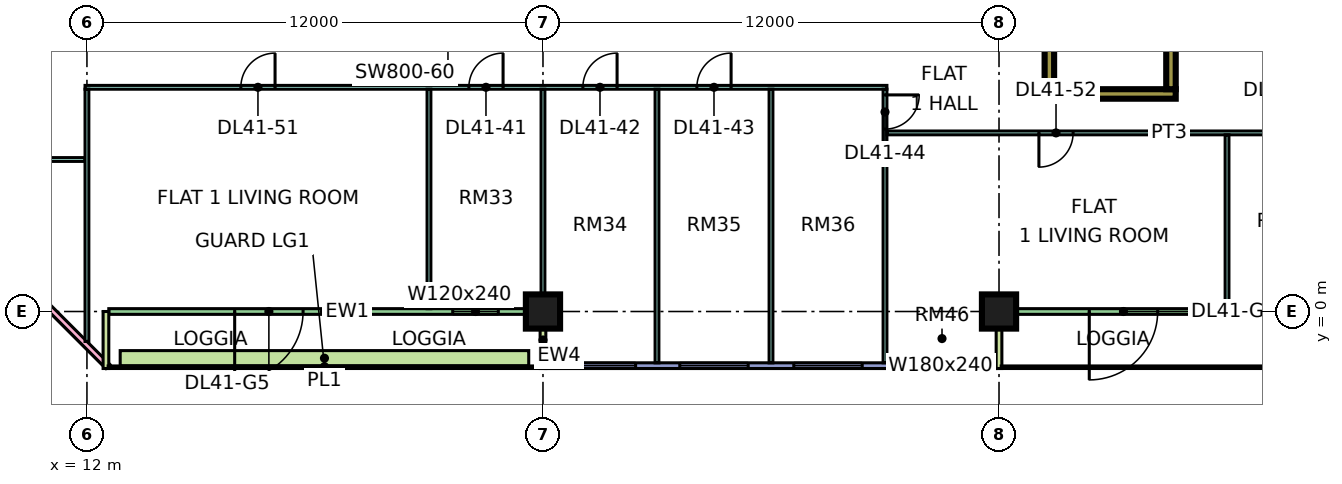
"""IFC4 building model, lengths in metres.
Left out: names, types, materials, properties, quantities, classifications, styles, units other than length and angle.
Written with IfcOpenShell. Run it as: python <this file> out.ifc"""

import sys

from ifc_helpers import new_model, si_unit, direction, frame, frame_2d, origin, origin_2d, place, context, subcontext, project, spatial, rectangle, extrude, element, fill, save


model = new_model("IFC4")
c1 = context("Model", 3, precision=1e-05, world=origin(), true_north=direction((0.0, 1.0)))
c2 = subcontext(c1, "Body", "Model", "MODEL_VIEW")
j1 = project(units=[si_unit("LENGTHUNIT", "METRE"), si_unit("PLANEANGLEUNIT", "RADIAN")], contexts=[c1])
p1 = place(None, origin())
s1 = spatial("IfcSite", under=j1, at=p1, CompositionType="ELEMENT")
p2 = place(p1, origin())
s2 = spatial("IfcBuilding", under=s1, at=p2, CompositionType="ELEMENT")
p3 = place(p2, frame((0.0, 0.0, 179.9)))
s3 = spatial("IfcBuildingStorey", under=s2, at=p3, CompositionType="ELEMENT", Elevation=179.9)
for number, where, z_axis, x_axis in (
    (1, (24.0, 0.0, 0.0), (0.0, 0.0, 1.0), (1.0, 0.0, 0.0)),
    (2, (36.0, 0.0, 0.0), (0.0, 0.0, 1.0), (1.0, 0.0, 0.0)),
):
    element("IfcColumn", number, at=place(p3, frame(where, z_axis=z_axis, x_axis=x_axis)), inside=s3, PredefinedType="COLUMN", context=c2, shape_type="SweptSolid", body=[
        extrude(rectangle(XDim=0.9, YDim=0.9, at=origin_2d()), origin(), (0.0, 0.0, 1.0), 3.75),
    ])
p4 = place(p3, frame((37.2, 5.725, 0.0), z_axis=(0.0, 0.0, 1.0), x_axis=(1.0, 0.0, 0.0)))
e3 = element("IfcWall", 3, at=p4, inside=s3, PredefinedType="SHEAR", context=c2, shape_type="SweptSolid", body=[
    extrude(rectangle(XDim=3.45, YDim=0.25, at=frame_2d((1.725, 0.0))), origin(), (0.0, 0.0, 1.0), 3.75),
])
for number, where, z_axis, x_axis in (
    (4, (37.325, 5.85, 0.0), (0.0, 0.0, 1.0), (0.0, 1.0, 0.0)),
    (5, (40.525, 5.85, 0.0), (0.0, 0.0, 1.0), (0.0, 1.0, 0.0)),
):
    element("IfcWall", number, at=place(p3, frame(where, z_axis=z_axis, x_axis=x_axis)), inside=s3, PredefinedType="SHEAR", context=c2, shape_type="SweptSolid", body=[
        extrude(rectangle(XDim=6.5, YDim=0.25, at=frame_2d((3.25, 0.0))), origin(), (0.0, 0.0, 1.0), 3.75),
    ])
p5 = place(p3, frame((-1.447, 12.553, 0.0), z_axis=(0.0, 0.0, 1.0), x_axis=(0.707106781187, -0.707106781187, 0.0)))
e6 = element("IfcWall", 6, at=p5, inside=s3, PredefinedType="SOLIDWALL", context=c2, shape_type="SweptSolid", body=[
    extrude(rectangle(XDim=19.799, YDim=0.15, at=frame_2d((9.899, 0.0))), origin(), (0.0, 0.0, 1.0), 3.35),
])
p6 = place(p5, frame((2.212, 0.0, 0.45)))
e7 = element("IfcOpeningElement", 7, at=p6, cuts=e6, PredefinedType="OPENING", context=c2, shape_type="SweptSolid", body=[
    extrude(rectangle(XDim=3.0, YDim=2.4, at=frame_2d((1.5, 1.2))), frame((0.0, 0.085, 0.0), z_axis=(0.0, -1.0, 0.0), x_axis=(1.0, 0.0, 0.0)), (0.0, 0.0, 1.0), 0.17),
])
p7 = place(p5, frame((10.216, 0.0, 0.45)))
e8 = element("IfcOpeningElement", 8, at=p7, cuts=e6, PredefinedType="OPENING", context=c2, shape_type="SweptSolid", body=[
    extrude(rectangle(XDim=3.0, YDim=2.4, at=frame_2d((1.5, 1.2))), frame((0.0, 0.085, 0.0), z_axis=(0.0, -1.0, 0.0), x_axis=(1.0, 0.0, 0.0)), (0.0, 0.0, 1.0), 0.17),
])
p8 = place(p3, frame((12.575, 0.0, 0.0), z_axis=(0.0, 0.0, 1.0), x_axis=(1.0, 0.0, 0.0)))
e9 = element("IfcWall", 9, at=p8, inside=s3, PredefinedType="SOLIDWALL", context=c2, shape_type="SweptSolid", body=[
    extrude(rectangle(XDim=11.35, YDim=0.15, at=frame_2d((5.675, 0.0))), origin(), (0.0, 0.0, 1.0), 3.35),
])
p9 = place(p8, frame((3.312, 0.0, 0.0)))
e10 = element("IfcOpeningElement", 10, at=p9, cuts=e9, PredefinedType="OPENING", context=c2, shape_type="SweptSolid", body=[
    extrude(rectangle(XDim=1.8, YDim=2.4, at=frame_2d((0.9, 1.2))), frame((0.0, 0.085, 0.0), z_axis=(0.0, -1.0, 0.0), x_axis=(1.0, 0.0, 0.0)), (0.0, 0.0, 1.0), 0.17),
])
p10 = place(p8, frame((9.05, 0.0, 0.45)))
e11 = element("IfcOpeningElement", 11, at=p10, cuts=e9, PredefinedType="OPENING", context=c2, shape_type="SweptSolid", body=[
    extrude(rectangle(XDim=1.2, YDim=2.4, at=frame_2d((0.6, 1.2))), frame((0.0, 0.085, 0.0), z_axis=(0.0, -1.0, 0.0), x_axis=(1.0, 0.0, 0.0)), (0.0, 0.0, 1.0), 0.17),
])
for number, where, z_axis, x_axis in (
    (12, (12.5, -1.5, 0.0), (0.0, 0.0, 1.0), (0.0, 1.0, 0.0)),
    (13, (24.0, -1.5, 0.0), (0.0, 0.0, 1.0), (0.0, 1.0, 0.0)),
):
    element("IfcWall", number, at=place(p3, frame(where, z_axis=z_axis, x_axis=x_axis)), inside=s3, PredefinedType="SOLIDWALL", context=c2, shape_type="SweptSolid", body=[
        extrude(rectangle(XDim=1.5, YDim=0.15, at=frame_2d((0.75, 0.0))), origin(), (0.0, 0.0, 1.0), 3.35),
    ])
p11 = place(p3, frame((24.075, -1.425, 0.0), z_axis=(0.0, 0.0, 1.0), x_axis=(1.0, 0.0, 0.0)))
e14 = element("IfcWall", 14, at=p11, inside=s3, PredefinedType="SOLIDWALL", context=c2, shape_type="SweptSolid", body=[
    extrude(rectangle(XDim=11.85, YDim=0.15, at=frame_2d((5.925, 0.0))), origin(), (0.0, 0.0, 1.0), 3.35),
])
p12 = place(p11, frame((0.562, 0.0, 0.45)))
e15 = element("IfcOpeningElement", 15, at=p12, cuts=e14, PredefinedType="OPENING", context=c2, shape_type="SweptSolid", body=[
    extrude(rectangle(XDim=1.8, YDim=2.4, at=frame_2d((0.9, 1.2))), frame((0.0, 0.085, 0.0), z_axis=(0.0, -1.0, 0.0), x_axis=(1.0, 0.0, 0.0)), (0.0, 0.0, 1.0), 0.17),
])
p13 = place(p11, frame((3.525, 0.0, 0.45)))
e16 = element("IfcOpeningElement", 16, at=p13, cuts=e14, PredefinedType="OPENING", context=c2, shape_type="SweptSolid", body=[
    extrude(rectangle(XDim=1.8, YDim=2.4, at=frame_2d((0.9, 1.2))), frame((0.0, 0.085, 0.0), z_axis=(0.0, -1.0, 0.0), x_axis=(1.0, 0.0, 0.0)), (0.0, 0.0, 1.0), 0.17),
])
p14 = place(p11, frame((6.525, 0.0, 0.45)))
e17 = element("IfcOpeningElement", 17, at=p14, cuts=e14, PredefinedType="OPENING", context=c2, shape_type="SweptSolid", body=[
    extrude(rectangle(XDim=1.8, YDim=2.4, at=frame_2d((0.9, 1.2))), frame((0.0, 0.085, 0.0), z_axis=(0.0, -1.0, 0.0), x_axis=(1.0, 0.0, 0.0)), (0.0, 0.0, 1.0), 0.17),
])
p15 = place(p11, frame((9.488, 0.0, 0.45)))
e18 = element("IfcOpeningElement", 18, at=p15, cuts=e14, PredefinedType="OPENING", context=c2, shape_type="SweptSolid", body=[
    extrude(rectangle(XDim=1.8, YDim=2.4, at=frame_2d((0.9, 1.2))), frame((0.0, 0.085, 0.0), z_axis=(0.0, -1.0, 0.0), x_axis=(1.0, 0.0, 0.0)), (0.0, 0.0, 1.0), 0.17),
])
p16 = place(p3, frame((36.075, 0.0, 0.0), z_axis=(0.0, 0.0, 1.0), x_axis=(1.0, 0.0, 0.0)))
e19 = element("IfcWall", 19, at=p16, inside=s3, PredefinedType="SOLIDWALL", context=c2, shape_type="SweptSolid", body=[
    extrude(rectangle(XDim=11.85, YDim=0.15, at=frame_2d((5.925, 0.0))), origin(), (0.0, 0.0, 1.0), 3.35),
])
p17 = place(p16, frame((2.3, 0.0, 0.0)))
e20 = element("IfcOpeningElement", 20, at=p17, cuts=e19, PredefinedType="OPENING", context=c2, shape_type="SweptSolid", body=[
    extrude(rectangle(XDim=1.8, YDim=2.4, at=frame_2d((0.9, 1.2))), frame((0.0, 0.085, 0.0), z_axis=(0.0, -1.0, 0.0), x_axis=(1.0, 0.0, 0.0)), (0.0, 0.0, 1.0), 0.17),
])
p18 = place(p16, frame((6.55, 0.0, 0.45)))
e21 = element("IfcOpeningElement", 21, at=p18, cuts=e19, PredefinedType="OPENING", context=c2, shape_type="SweptSolid", body=[
    extrude(rectangle(XDim=1.2, YDim=2.4, at=frame_2d((0.6, 1.2))), frame((0.0, 0.085, 0.0), z_axis=(0.0, -1.0, 0.0), x_axis=(1.0, 0.0, 0.0)), (0.0, 0.0, 1.0), 0.17),
])
p19 = place(p16, frame((10.062, 0.0, 0.45)))
e22 = element("IfcOpeningElement", 22, at=p19, cuts=e19, PredefinedType="OPENING", context=c2, shape_type="SweptSolid", body=[
    extrude(rectangle(XDim=1.2, YDim=2.4, at=frame_2d((0.6, 1.2))), frame((0.0, 0.085, 0.0), z_axis=(0.0, -1.0, 0.0), x_axis=(1.0, 0.0, 0.0)), (0.0, 0.0, 1.0), 0.17),
])
p20 = place(p3, frame((36.0, -1.5, 0.0), z_axis=(0.0, 0.0, 1.0), x_axis=(0.0, 1.0, 0.0)))
e23 = element("IfcWall", 23, at=p20, inside=s3, PredefinedType="SOLIDWALL", context=c2, shape_type="SweptSolid", body=[
    extrude(rectangle(XDim=1.5, YDim=0.15, at=frame_2d((0.75, 0.0))), origin(), (0.0, 0.0, 1.0), 3.35),
])
p21 = place(p3, frame((12.875, -1.229, 0.0), z_axis=(0.0, 0.0, 1.0), x_axis=(1.0, 0.0, 0.0)))
e24 = element("IfcWall", 24, at=p21, inside=s3, PredefinedType="SOLIDWALL", context=c2, shape_type="SweptSolid", body=[
    extrude(rectangle(XDim=10.75, YDim=0.4, at=frame_2d((5.375, 0.0))), origin(), (0.0, 0.0, 1.0), 0.7),
])
p22 = place(p3, frame((9.05, 4.0, 0.0), z_axis=(0.0, 0.0, 1.0), x_axis=(1.0, 0.0, 0.0)))
e25 = element("IfcWall", 25, at=p22, inside=s3, PredefinedType="PARTITIONING", context=c2, shape_type="SweptSolid", body=[
    extrude(rectangle(XDim=2.9, YDim=0.1, at=frame_2d((1.45, 0.0))), origin(), (0.0, 0.0, 1.0), 3.35),
])
p23 = place(p3, frame((11.95, 5.9, 0.0), z_axis=(0.0, 0.0, 1.0), x_axis=(1.0, 0.0, 0.0)))
e26 = element("IfcWall", 26, at=p23, inside=s3, PredefinedType="PARTITIONING", context=c2, shape_type="SweptSolid", body=[
    extrude(rectangle(XDim=21.1, YDim=0.1, at=frame_2d((10.55, 0.0))), origin(), (0.0, 0.0, 1.0), 3.35),
])
p24 = place(p23, frame((10.1, 0.0, 0.0)))
e27 = element("IfcOpeningElement", 27, at=p24, cuts=e26, PredefinedType="OPENING", context=c2, shape_type="SweptSolid", body=[
    extrude(rectangle(XDim=0.9, YDim=2.1, at=frame_2d((0.45, 1.05))), frame((0.0, 0.06, 0.0), z_axis=(0.0, -1.0, 0.0), x_axis=(1.0, 0.0, 0.0)), (0.0, 0.0, 1.0), 0.12),
])
p25 = place(p23, frame((13.1, 0.0, 0.0)))
e28 = element("IfcOpeningElement", 28, at=p25, cuts=e26, PredefinedType="OPENING", context=c2, shape_type="SweptSolid", body=[
    extrude(rectangle(XDim=0.9, YDim=2.1, at=frame_2d((0.45, 1.05))), frame((0.0, 0.06, 0.0), z_axis=(0.0, -1.0, 0.0), x_axis=(1.0, 0.0, 0.0)), (0.0, 0.0, 1.0), 0.12),
])
p26 = place(p23, frame((16.1, 0.0, 0.0)))
e29 = element("IfcOpeningElement", 29, at=p26, cuts=e26, PredefinedType="OPENING", context=c2, shape_type="SweptSolid", body=[
    extrude(rectangle(XDim=0.9, YDim=2.1, at=frame_2d((0.45, 1.05))), frame((0.0, 0.06, 0.0), z_axis=(0.0, -1.0, 0.0), x_axis=(1.0, 0.0, 0.0)), (0.0, 0.0, 1.0), 0.12),
])
p27 = place(p23, frame((4.1, 0.0, 0.0)))
e30 = element("IfcOpeningElement", 30, at=p27, cuts=e26, PredefinedType="OPENING", context=c2, shape_type="SweptSolid", body=[
    extrude(rectangle(XDim=0.9, YDim=2.1, at=frame_2d((0.45, 1.05))), frame((0.0, 0.06, 0.0), z_axis=(0.0, -1.0, 0.0), x_axis=(1.0, 0.0, 0.0)), (0.0, 0.0, 1.0), 0.12),
])
p28 = place(p3, frame((12.0, -0.788, 0.0), z_axis=(0.0, 0.0, 1.0), x_axis=(0.0, 1.0, 0.0)))
e31 = element("IfcWall", 31, at=p28, inside=s3, PredefinedType="PARTITIONING", context=c2, shape_type="SweptSolid", body=[
    extrude(rectangle(XDim=6.638, YDim=0.1, at=frame_2d((3.319, 0.0))), origin(), (0.0, 0.0, 1.0), 3.35),
])
p29 = place(p3, frame((21.0, 0.074, 0.0), z_axis=(0.0, 0.0, 1.0), x_axis=(0.0, 1.0, 0.0)))
e32 = element("IfcWall", 32, at=p29, inside=s3, PredefinedType="PARTITIONING", context=c2, shape_type="SweptSolid", body=[
    extrude(rectangle(XDim=5.776, YDim=0.1, at=frame_2d((2.888, 0.0))), origin(), (0.0, 0.0, 1.0), 3.35),
])
p30 = place(p3, frame((24.0, 0.0, 0.0), z_axis=(0.0, 0.0, 1.0), x_axis=(0.0, 1.0, 0.0)))
e33 = element("IfcWall", 33, at=p30, inside=s3, PredefinedType="PARTITIONING", context=c2, shape_type="SweptSolid", body=[
    extrude(rectangle(XDim=5.85, YDim=0.1, at=frame_2d((2.925, 0.0))), origin(), (0.0, 0.0, 1.0), 3.35),
])
for number, where, z_axis, x_axis in (
    (34, (27.0, -1.351, 0.0), (0.0, 0.0, 1.0), (0.0, 1.0, 0.0)),
    (35, (30.0, -1.351, 0.0), (0.0, 0.0, 1.0), (0.0, 1.0, 0.0)),
):
    element("IfcWall", number, at=place(p3, frame(where, z_axis=z_axis, x_axis=x_axis)), inside=s3, PredefinedType="PARTITIONING", context=c2, shape_type="SweptSolid", body=[
        extrude(rectangle(XDim=7.201, YDim=0.1, at=frame_2d((3.601, 0.0))), origin(), (0.0, 0.0, 1.0), 3.35),
    ])
p31 = place(p3, frame((33.0, -1.35, 0.0), z_axis=(0.0, 0.0, 1.0), x_axis=(0.0, 1.0, 0.0)))
e36 = element("IfcWall", 36, at=p31, inside=s3, PredefinedType="PARTITIONING", context=c2, shape_type="SweptSolid", body=[
    extrude(rectangle(XDim=7.2, YDim=0.1, at=frame_2d((3.6, 0.0))), origin(), (0.0, 0.0, 1.0), 3.35),
])
p32 = place(p31, frame((6.15, 0.0, 0.0)))
e37 = element("IfcOpeningElement", 37, at=p32, cuts=e36, PredefinedType="OPENING", context=c2, shape_type="SweptSolid", body=[
    extrude(rectangle(XDim=0.9, YDim=2.1, at=frame_2d((0.45, 1.05))), frame((0.0, 0.06, 0.0), z_axis=(0.0, -1.0, 0.0), x_axis=(1.0, 0.0, 0.0)), (0.0, 0.0, 1.0), 0.12),
])
p33 = place(p3, frame((33.05, 4.7, 0.0), z_axis=(0.0, 0.0, 1.0), x_axis=(1.0, 0.0, 0.0)))
e38 = element("IfcWall", 38, at=p33, inside=s3, PredefinedType="PARTITIONING", context=c2, shape_type="SweptSolid", body=[
    extrude(rectangle(XDim=14.85, YDim=0.1, at=frame_2d((7.425, 0.0))), origin(), (0.0, 0.0, 1.0), 3.35),
])
p34 = place(p33, frame((10.0, 0.0, 0.0)))
e39 = element("IfcOpeningElement", 39, at=p34, cuts=e38, PredefinedType="OPENING", context=c2, shape_type="SweptSolid", body=[
    extrude(rectangle(XDim=0.9, YDim=2.1, at=frame_2d((0.45, 1.05))), frame((0.0, 0.06, 0.0), z_axis=(0.0, -1.0, 0.0), x_axis=(1.0, 0.0, 0.0)), (0.0, 0.0, 1.0), 0.12),
])
p35 = place(p33, frame((13.0, 0.0, 0.0)))
e40 = element("IfcOpeningElement", 40, at=p35, cuts=e38, PredefinedType="OPENING", context=c2, shape_type="SweptSolid", body=[
    extrude(rectangle(XDim=0.9, YDim=2.1, at=frame_2d((0.45, 1.05))), frame((0.0, 0.06, 0.0), z_axis=(0.0, -1.0, 0.0), x_axis=(1.0, 0.0, 0.0)), (0.0, 0.0, 1.0), 0.12),
])
p36 = place(p33, frame((4.0, 0.0, 0.0)))
e41 = element("IfcOpeningElement", 41, at=p36, cuts=e38, PredefinedType="OPENING", context=c2, shape_type="SweptSolid", body=[
    extrude(rectangle(XDim=0.9, YDim=2.1, at=frame_2d((0.45, 1.05))), frame((0.0, 0.06, 0.0), z_axis=(0.0, -1.0, 0.0), x_axis=(1.0, 0.0, 0.0)), (0.0, 0.0, 1.0), 0.12),
])
p37 = place(p3, frame((42.0, 0.074, 0.0), z_axis=(0.0, 0.0, 1.0), x_axis=(0.0, 1.0, 0.0)))
e42 = element("IfcWall", 42, at=p37, inside=s3, PredefinedType="PARTITIONING", context=c2, shape_type="SweptSolid", body=[
    extrude(rectangle(XDim=4.576, YDim=0.1, at=frame_2d((2.288, 0.0))), origin(), (0.0, 0.0, 1.0), 3.35),
])
p38 = place(p9, frame((1.8, 0.0, 0.0), z_axis=(0.0, 0.0, 1.0), x_axis=(-1.0, 0.0, 0.0)))
e43 = element("IfcDoor", 43, at=p38, inside=s3, OperationType="DOUBLE_DOOR_SINGLE_SWING", PredefinedType="DOOR", context=c2, shape_type="SweptSolid", body=[
    extrude(rectangle(XDim=1.8, YDim=2.4, at=frame_2d((0.9, 1.2))), frame((0.0, 0.025, 0.0), z_axis=(0.0, -1.0, 0.0), x_axis=(1.0, 0.0, 0.0)), (0.0, 0.0, 1.0), 0.05),
])
fill(e10, e43)
p39 = place(p10, origin())
e44 = element("IfcWindow", 44, at=p39, inside=s3, PartitioningType="SINGLE_PANEL", PredefinedType="WINDOW", context=c2, shape_type="SweptSolid", body=[
    extrude(rectangle(XDim=1.2, YDim=2.4, at=frame_2d((0.6, 1.2))), frame((0.0, 0.03, 0.0), z_axis=(0.0, -1.0, 0.0), x_axis=(1.0, 0.0, 0.0)), (0.0, 0.0, 1.0), 0.06),
])
fill(e11, e44)
p40 = place(p12, origin())
e45 = element("IfcWindow", 45, at=p40, inside=s3, PartitioningType="SINGLE_PANEL", PredefinedType="WINDOW", context=c2, shape_type="SweptSolid", body=[
    extrude(rectangle(XDim=1.8, YDim=2.4, at=frame_2d((0.9, 1.2))), frame((0.0, 0.03, 0.0), z_axis=(0.0, -1.0, 0.0), x_axis=(1.0, 0.0, 0.0)), (0.0, 0.0, 1.0), 0.06),
])
fill(e15, e45)
p41 = place(p13, origin())
e46 = element("IfcWindow", 46, at=p41, inside=s3, PartitioningType="SINGLE_PANEL", PredefinedType="WINDOW", context=c2, shape_type="SweptSolid", body=[
    extrude(rectangle(XDim=1.8, YDim=2.4, at=frame_2d((0.9, 1.2))), frame((0.0, 0.03, 0.0), z_axis=(0.0, -1.0, 0.0), x_axis=(1.0, 0.0, 0.0)), (0.0, 0.0, 1.0), 0.06),
])
fill(e16, e46)
p42 = place(p14, origin())
e47 = element("IfcWindow", 47, at=p42, inside=s3, PartitioningType="SINGLE_PANEL", PredefinedType="WINDOW", context=c2, shape_type="SweptSolid", body=[
    extrude(rectangle(XDim=1.8, YDim=2.4, at=frame_2d((0.9, 1.2))), frame((0.0, 0.03, 0.0), z_axis=(0.0, -1.0, 0.0), x_axis=(1.0, 0.0, 0.0)), (0.0, 0.0, 1.0), 0.06),
])
fill(e17, e47)
p43 = place(p15, origin())
e48 = element("IfcWindow", 48, at=p43, inside=s3, PartitioningType="SINGLE_PANEL", PredefinedType="WINDOW", context=c2, shape_type="SweptSolid", body=[
    extrude(rectangle(XDim=1.8, YDim=2.4, at=frame_2d((0.9, 1.2))), frame((0.0, 0.03, 0.0), z_axis=(0.0, -1.0, 0.0), x_axis=(1.0, 0.0, 0.0)), (0.0, 0.0, 1.0), 0.06),
])
fill(e18, e48)
p44 = place(p17, frame((1.8, 0.0, 0.0), z_axis=(0.0, 0.0, 1.0), x_axis=(-1.0, 0.0, 0.0)))
e49 = element("IfcDoor", 49, at=p44, inside=s3, OperationType="DOUBLE_DOOR_SINGLE_SWING", PredefinedType="DOOR", context=c2, shape_type="SweptSolid", body=[
    extrude(rectangle(XDim=1.8, YDim=2.4, at=frame_2d((0.9, 1.2))), frame((0.0, 0.025, 0.0), z_axis=(0.0, -1.0, 0.0), x_axis=(1.0, 0.0, 0.0)), (0.0, 0.0, 1.0), 0.05),
])
fill(e20, e49)
p45 = place(p18, origin())
e50 = element("IfcWindow", 50, at=p45, inside=s3, PartitioningType="SINGLE_PANEL", PredefinedType="WINDOW", context=c2, shape_type="SweptSolid", body=[
    extrude(rectangle(XDim=1.2, YDim=2.4, at=frame_2d((0.6, 1.2))), frame((0.0, 0.03, 0.0), z_axis=(0.0, -1.0, 0.0), x_axis=(1.0, 0.0, 0.0)), (0.0, 0.0, 1.0), 0.06),
])
fill(e21, e50)
p46 = place(p24, frame((0.9, 0.0, 0.0), z_axis=(0.0, 0.0, 1.0), x_axis=(-1.0, 0.0, 0.0)))
e51 = element("IfcDoor", 51, at=p46, inside=s3, OperationType="SINGLE_SWING_RIGHT", PredefinedType="DOOR", context=c2, shape_type="SweptSolid", body=[
    extrude(rectangle(XDim=0.9, YDim=2.1, at=frame_2d((0.45, 1.05))), frame((0.0, 0.025, 0.0), z_axis=(0.0, -1.0, 0.0), x_axis=(1.0, 0.0, 0.0)), (0.0, 0.0, 1.0), 0.05),
])
fill(e27, e51)
p47 = place(p25, frame((0.9, 0.0, 0.0), z_axis=(0.0, 0.0, 1.0), x_axis=(-1.0, 0.0, 0.0)))
e52 = element("IfcDoor", 52, at=p47, inside=s3, OperationType="SINGLE_SWING_RIGHT", PredefinedType="DOOR", context=c2, shape_type="SweptSolid", body=[
    extrude(rectangle(XDim=0.9, YDim=2.1, at=frame_2d((0.45, 1.05))), frame((0.0, 0.025, 0.0), z_axis=(0.0, -1.0, 0.0), x_axis=(1.0, 0.0, 0.0)), (0.0, 0.0, 1.0), 0.05),
])
fill(e28, e52)
p48 = place(p26, frame((0.9, 0.0, 0.0), z_axis=(0.0, 0.0, 1.0), x_axis=(-1.0, 0.0, 0.0)))
e53 = element("IfcDoor", 53, at=p48, inside=s3, OperationType="SINGLE_SWING_RIGHT", PredefinedType="DOOR", context=c2, shape_type="SweptSolid", body=[
    extrude(rectangle(XDim=0.9, YDim=2.1, at=frame_2d((0.45, 1.05))), frame((0.0, 0.025, 0.0), z_axis=(0.0, -1.0, 0.0), x_axis=(1.0, 0.0, 0.0)), (0.0, 0.0, 1.0), 0.05),
])
fill(e29, e53)
p49 = place(p32, origin())
e54 = element("IfcDoor", 54, at=p49, inside=s3, OperationType="SINGLE_SWING_RIGHT", PredefinedType="DOOR", context=c2, shape_type="SweptSolid", body=[
    extrude(rectangle(XDim=0.9, YDim=2.1, at=frame_2d((0.45, 1.05))), frame((0.0, 0.025, 0.0), z_axis=(0.0, -1.0, 0.0), x_axis=(1.0, 0.0, 0.0)), (0.0, 0.0, 1.0), 0.05),
])
fill(e37, e54)
p50 = place(p27, frame((0.9, 0.0, 0.0), z_axis=(0.0, 0.0, 1.0), x_axis=(-1.0, 0.0, 0.0)))
e55 = element("IfcDoor", 55, at=p50, inside=s3, OperationType="SINGLE_SWING_RIGHT", PredefinedType="DOOR", context=c2, shape_type="SweptSolid", body=[
    extrude(rectangle(XDim=0.9, YDim=2.1, at=frame_2d((0.45, 1.05))), frame((0.0, 0.025, 0.0), z_axis=(0.0, -1.0, 0.0), x_axis=(1.0, 0.0, 0.0)), (0.0, 0.0, 1.0), 0.05),
])
fill(e30, e55)
p51 = place(p36, frame((0.9, 0.0, 0.0), z_axis=(0.0, 0.0, 1.0), x_axis=(-1.0, 0.0, 0.0)))
e56 = element("IfcDoor", 56, at=p51, inside=s3, OperationType="SINGLE_SWING_LEFT", PredefinedType="DOOR", context=c2, shape_type="SweptSolid", body=[
    extrude(rectangle(XDim=0.9, YDim=2.1, at=frame_2d((0.45, 1.05))), frame((0.0, 0.025, 0.0), z_axis=(0.0, -1.0, 0.0), x_axis=(1.0, 0.0, 0.0)), (0.0, 0.0, 1.0), 0.05),
])
fill(e41, e56)
save(model, sys.argv[1])
